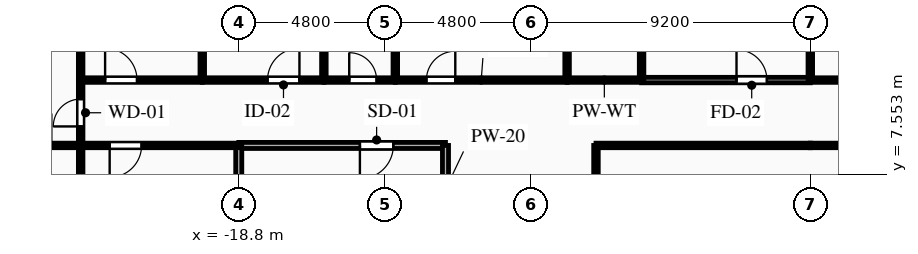
"""IFC4 building model, lengths in metres.
Left out: names, types, materials, properties, quantities, classifications, styles, units other than length and angle.
Written with IfcOpenShell. Run it as: python <this file> out.ifc"""

import sys

from ifc_helpers import new_model, si_unit, direction, frame, frame_2d, origin, place, context, subcontext, project, spatial, rectangle, extrude, element, fill, save


model = new_model("IFC4")
c1 = context("Model", 3, precision=1e-05, world=origin(), true_north=direction((0.0, 1.0)))
c2 = subcontext(c1, "Body", "Model", "MODEL_VIEW")
j1 = project(units=[si_unit("LENGTHUNIT", "METRE"), si_unit("PLANEANGLEUNIT", "RADIAN")], contexts=[c1])
p1 = place(None, origin())
s1 = spatial("IfcSite", under=j1, at=p1, CompositionType="ELEMENT")
p2 = place(p1, origin())
s2 = spatial("IfcBuilding", under=s1, at=p2, CompositionType="ELEMENT")
p3 = place(p2, frame((0.0, 0.0, 18.0)))
s3 = spatial("IfcBuildingStorey", under=s2, at=p3, CompositionType="ELEMENT", Elevation=18.0)
p4 = place(p3, frame((-12.0, 8.5, 0.0), z_axis=(0.0, 0.0, 1.0), x_axis=(-1.0, 0.0, 0.0)))
e1 = element("IfcWall", 1, at=p4, inside=s3, PredefinedType="PARTITIONING", context=c2, shape_type="SweptSolid", body=[
    extrude(rectangle(XDim=6.8, YDim=0.2, at=frame_2d((3.4, 0.0))), origin(), (0.0, 0.0, 1.0), 4.17),
])
p5 = place(p4, frame((1.715, 0.0, 0.0)))
e2 = element("IfcOpeningElement", 2, at=p5, cuts=e1, PredefinedType="OPENING", context=c2, shape_type="SweptSolid", body=[
    extrude(rectangle(XDim=1.1, YDim=2.15, at=frame_2d((0.55, 1.075))), frame((0.0, 0.11, 0.0), z_axis=(0.0, -1.0, 0.0), x_axis=(1.0, 0.0, 0.0)), (0.0, 0.0, 1.0), 0.22),
])
p6 = place(p3, frame((-12.0, 5.6, 0.0), z_axis=(0.0, 0.0, 1.0), x_axis=(0.0, 1.0, 0.0)))
e3 = element("IfcWall", 3, at=p6, inside=s3, PredefinedType="PARTITIONING", context=c2, shape_type="SweptSolid", body=[
    extrude(rectangle(XDim=2.9, YDim=0.2, at=frame_2d((1.45, 0.0))), origin(), (0.0, 0.0, 1.0), 4.17),
])
p7 = place(p3, frame((-18.8, 8.5, 0.0), z_axis=(0.0, 0.0, 1.0), x_axis=(0.0, -1.0, 0.0)))
e4 = element("IfcWall", 4, at=p7, inside=s3, PredefinedType="PARTITIONING", context=c2, shape_type="SweptSolid", body=[
    extrude(rectangle(XDim=2.9, YDim=0.2, at=frame_2d((1.45, 0.0))), origin(), (0.0, 0.0, 1.0), 3.655),
])
p8 = place(p3, frame((-24.0, 8.5, 0.0), z_axis=(0.0, 0.0, 1.0), x_axis=(0.0, 1.0, 0.0)))
e5 = element("IfcWall", 5, at=p8, inside=s3, PredefinedType="PARTITIONING", context=c2, shape_type="SweptSolid", body=[
    extrude(rectangle(XDim=2.15, YDim=0.15, at=frame_2d((1.075, 0.0))), origin(), (0.0, 0.0, 1.0), 4.17),
])
p9 = place(p8, frame((0.625, 0.0, 0.0)))
e6 = element("IfcOpeningElement", 6, at=p9, cuts=e5, PredefinedType="OPENING", context=c2, shape_type="SweptSolid", body=[
    extrude(rectangle(XDim=0.9, YDim=2.1, at=frame_2d((0.45, 1.05))), frame((0.0, 0.085, 0.0), z_axis=(0.0, -1.0, 0.0), x_axis=(1.0, 0.0, 0.0)), (0.0, 0.0, 1.0), 0.17),
])
p10 = place(p3, frame((-18.8, 8.5, 0.0), z_axis=(0.0, 0.0, 1.0), x_axis=(-1.0, 0.0, 0.0)))
e7 = element("IfcWall", 7, at=p10, inside=s3, PredefinedType="PARTITIONING", context=c2, shape_type="SweptSolid", body=[
    extrude(rectangle(XDim=5.2, YDim=0.15, at=frame_2d((2.6, 0.0))), origin(), (0.0, 0.0, 1.0), 4.17),
])
p11 = place(p10, frame((3.196, 0.0, 0.0)))
e8 = element("IfcOpeningElement", 8, at=p11, cuts=e7, PredefinedType="OPENING", context=c2, shape_type="SweptSolid", body=[
    extrude(rectangle(XDim=1.05, YDim=2.15, at=frame_2d((0.525, 1.075))), frame((0.0, 0.085, 0.0), z_axis=(0.0, -1.0, 0.0), x_axis=(1.0, 0.0, 0.0)), (0.0, 0.0, 1.0), 0.17),
])
p12 = place(p3, frame((-24.0, 10.65, 0.0), z_axis=(0.0, 0.0, 1.0), x_axis=(1.0, 0.0, 0.0)))
e9 = element("IfcWall", 9, at=p12, inside=s3, PredefinedType="PARTITIONING", context=c2, shape_type="SweptSolid", body=[
    extrude(rectangle(XDim=4.0, YDim=0.15, at=frame_2d((2.0, 0.0))), origin(), (0.0, 0.0, 1.0), 4.17),
])
p13 = place(p12, frame((0.804, 0.0, 0.0)))
e10 = element("IfcOpeningElement", 10, at=p13, cuts=e9, PredefinedType="OPENING", context=c2, shape_type="SweptSolid", body=[
    extrude(rectangle(XDim=1.05, YDim=2.15, at=frame_2d((0.525, 1.075))), frame((0.0, 0.085, 0.0), z_axis=(0.0, -1.0, 0.0), x_axis=(1.0, 0.0, 0.0)), (0.0, 0.0, 1.0), 0.17),
])
p14 = place(p3, frame((-20.0, 10.65, 0.0), z_axis=(0.0, 0.0, 1.0), x_axis=(1.0, 0.0, 0.0)))
e11 = element("IfcWall", 11, at=p14, inside=s3, PredefinedType="PARTITIONING", context=c2, shape_type="SweptSolid", body=[
    extrude(rectangle(XDim=4.0, YDim=0.15, at=frame_2d((2.0, 0.0))), origin(), (0.0, 0.0, 1.0), 4.17),
])
p15 = place(p14, frame((2.146, 0.0, 0.0)))
e12 = element("IfcOpeningElement", 12, at=p15, cuts=e11, PredefinedType="OPENING", context=c2, shape_type="SweptSolid", body=[
    extrude(rectangle(XDim=1.05, YDim=2.15, at=frame_2d((0.525, 1.075))), frame((0.0, 0.085, 0.0), z_axis=(0.0, -1.0, 0.0), x_axis=(1.0, 0.0, 0.0)), (0.0, 0.0, 1.0), 0.17),
])
p16 = place(p3, frame((-16.0, 10.65, 0.0), z_axis=(0.0, 0.0, 1.0), x_axis=(1.0, 0.0, 0.0)))
e13 = element("IfcWall", 13, at=p16, inside=s3, PredefinedType="PLUMBINGWALL", context=c2, shape_type="SweptSolid", body=[
    extrude(rectangle(XDim=2.35, YDim=0.15, at=frame_2d((1.175, 0.0))), origin(), (0.0, 0.0, 1.0), 4.17),
])
p17 = place(p16, frame((0.834, 0.0, 0.0)))
e14 = element("IfcOpeningElement", 14, at=p17, cuts=e13, PredefinedType="OPENING", context=c2, shape_type="SweptSolid", body=[
    extrude(rectangle(XDim=0.9, YDim=2.1, at=frame_2d((0.45, 1.05))), frame((0.0, 0.085, 0.0), z_axis=(0.0, -1.0, 0.0), x_axis=(1.0, 0.0, 0.0)), (0.0, 0.0, 1.0), 0.17),
])
p18 = place(p3, frame((-13.65, 10.65, 0.0), z_axis=(0.0, 0.0, 1.0), x_axis=(1.0, 0.0, 0.0)))
e15 = element("IfcWall", 15, at=p18, inside=s3, PredefinedType="PARTITIONING", context=c2, shape_type="SweptSolid", body=[
    extrude(rectangle(XDim=5.65, YDim=0.15, at=frame_2d((2.825, 0.0))), origin(), (0.0, 0.0, 1.0), 4.17),
])
p19 = place(p18, frame((1.022, 0.0, 0.0)))
e16 = element("IfcOpeningElement", 16, at=p19, cuts=e15, PredefinedType="OPENING", context=c2, shape_type="SweptSolid", body=[
    extrude(rectangle(XDim=0.95, YDim=2.1, at=frame_2d((0.475, 1.05))), frame((0.0, 0.085, 0.0), z_axis=(0.0, -1.0, 0.0), x_axis=(1.0, 0.0, 0.0)), (0.0, 0.0, 1.0), 0.17),
])
p20 = place(p3, frame((-5.55, 10.65, 0.0), z_axis=(0.0, 0.0, 1.0), x_axis=(1.0, 0.0, 0.0)))
e17 = element("IfcWall", 17, at=p20, inside=s3, PredefinedType="PARTITIONING", context=c2, shape_type="SweptSolid", body=[
    extrude(rectangle(XDim=5.55, YDim=0.18, at=frame_2d((2.775, 0.0))), origin(), (0.0, 0.0, 1.0), 4.17),
])
p21 = place(p20, frame((3.123, 0.0, 0.0)))
e18 = element("IfcOpeningElement", 18, at=p21, cuts=e17, PredefinedType="OPENING", context=c2, shape_type="SweptSolid", body=[
    extrude(rectangle(XDim=1.0, YDim=2.15, at=frame_2d((0.5, 1.075))), frame((0.0, 0.1, 0.0), z_axis=(0.0, -1.0, 0.0), x_axis=(1.0, 0.0, 0.0)), (0.0, 0.0, 1.0), 0.2),
])
p22 = place(p3, frame((-8.0, 10.65, 0.0), z_axis=(0.0, 0.0, 1.0), x_axis=(1.0, 0.0, 0.0)))
e19 = element("IfcWall", 19, at=p22, inside=s3, PredefinedType="PLUMBINGWALL", context=c2, shape_type="SweptSolid", body=[
    extrude(rectangle(XDim=2.45, YDim=0.15, at=frame_2d((1.225, 0.0))), origin(), (0.0, 0.0, 1.0), 4.17),
])
p23 = place(p3, frame((0.0, 8.5, 0.0), z_axis=(0.0, 0.0, 1.0), x_axis=(-1.0, 0.0, 0.0)))
e20 = element("IfcWall", 20, at=p23, inside=s3, PredefinedType="PARTITIONING", context=c2, shape_type="SweptSolid", body=[
    extrude(rectangle(XDim=7.05, YDim=0.15, at=frame_2d((3.525, 0.0))), origin(), (0.0, 0.0, 1.0), 4.17),
])
p24 = place(p3, frame((0.0, 10.65, 0.0), z_axis=(0.0, 0.0, 1.0), x_axis=(1.0, 0.0, 0.0)))
e21 = element("IfcWall", 21, at=p24, inside=s3, PredefinedType="PLUMBINGWALL", context=c2, shape_type="SweptSolid", body=[
    extrude(rectangle(XDim=2.45, YDim=0.15, at=frame_2d((1.225, 0.0))), origin(), (0.0, 0.0, 1.0), 4.17),
])
p25 = place(p3, frame((7.05, 8.5, 0.0), z_axis=(0.0, 0.0, 1.0), x_axis=(-1.0, 0.0, 0.0)))
e22 = element("IfcWall", 22, at=p25, inside=s3, PredefinedType="PARTITIONING", context=c2, shape_type="SweptSolid", body=[
    extrude(rectangle(XDim=7.05, YDim=0.15, at=frame_2d((3.525, 0.0))), origin(), (0.0, 0.0, 1.0), 4.17),
])
p26 = place(p3, frame((-7.05, 8.5, 0.0), z_axis=(0.0, 0.0, 1.0), x_axis=(0.0, -1.0, 0.0)))
e23 = element("IfcWall", 23, at=p26, inside=s3, PredefinedType="PARTITIONING", context=c2, shape_type="SweptSolid", body=[
    extrude(rectangle(XDim=14.1, YDim=0.15, at=frame_2d((7.05, 0.0))), origin(), (0.0, 0.0, 1.0), 4.17),
])
p27 = place(p26, frame((8.011, 0.0, 0.0)))
e24 = element("IfcOpeningElement", 24, at=p27, cuts=e23, PredefinedType="OPENING", context=c2, shape_type="SweptSolid", body=[
    extrude(rectangle(XDim=1.05, YDim=2.15, at=frame_2d((0.525, 1.075))), frame((0.0, 0.085, 0.0), z_axis=(0.0, -1.0, 0.0), x_axis=(1.0, 0.0, 0.0)), (0.0, 0.0, 1.0), 0.17),
])
p28 = place(p3, frame((-26.65, 8.5, 0.0), z_axis=(0.0, 0.0, 1.0), x_axis=(1.0, 0.0, 0.0)))
e25 = element("IfcWall", 25, at=p28, inside=s3, PredefinedType="PARTITIONING", context=c2, shape_type="SweptSolid", body=[
    extrude(rectangle(XDim=2.65, YDim=0.15, at=frame_2d((1.325, 0.0))), origin(), (0.0, 0.0, 1.0), 4.17),
])
p29 = place(p28, frame((0.635, 0.0, 0.0)))
e26 = element("IfcOpeningElement", 26, at=p29, cuts=e25, PredefinedType="OPENING", context=c2, shape_type="SweptSolid", body=[
    extrude(rectangle(XDim=1.05, YDim=2.15, at=frame_2d((0.525, 1.075))), frame((0.0, 0.085, 0.0), z_axis=(0.0, -1.0, 0.0), x_axis=(1.0, 0.0, 0.0)), (0.0, 0.0, 1.0), 0.17),
])
p30 = place(p3, frame((-24.0, 8.5, 0.0), z_axis=(0.0, 0.0, 1.0), x_axis=(0.0, -1.0, 0.0)))
e27 = element("IfcWall", 27, at=p30, inside=s3, PredefinedType="PARTITIONING", context=c2, shape_type="SweptSolid", body=[
    extrude(rectangle(XDim=14.1, YDim=0.15, at=frame_2d((7.05, 0.0))), origin(), (0.0, 0.0, 1.0), 4.17),
])
for number, where, z_axis, x_axis in (
    (28, (-24.0, 24.8, 0.0), (0.0, 0.0, 1.0), (0.0, -1.0, 0.0)),
    (29, (-20.0, 24.8, 0.0), (0.0, 0.0, 1.0), (0.0, -1.0, 0.0)),
):
    element("IfcWall", number, at=place(p3, frame(where, z_axis=z_axis, x_axis=x_axis)), inside=s3, PredefinedType="PARTITIONING", context=c2, shape_type="SweptSolid", body=[
        extrude(rectangle(XDim=14.15, YDim=0.15, at=frame_2d((7.075, 0.0))), origin(), (0.0, 0.0, 1.0), 4.17),
    ])
for number, where, z_axis, x_axis in (
    (30, (-16.0, 24.8, 0.0), (0.0, 0.0, 1.0), (0.0, -1.0, 0.0)),
    (31, (-13.65, 24.8, 0.0), (0.0, 0.0, 1.0), (0.0, -1.0, 0.0)),
):
    element("IfcWall", number, at=place(p3, frame(where, z_axis=z_axis, x_axis=x_axis)), inside=s3, PredefinedType="PLUMBINGWALL", context=c2, shape_type="SweptSolid", body=[
        extrude(rectangle(XDim=14.15, YDim=0.15, at=frame_2d((7.075, 0.0))), origin(), (0.0, 0.0, 1.0), 4.17),
    ])
for number, where, z_axis, x_axis in (
    (32, (-8.0, 12.8, 0.0), (0.0, 0.0, 1.0), (0.0, -1.0, 0.0)),
    (33, (-5.55, 10.65, 0.0), (0.0, 0.0, 1.0), (0.0, 1.0, 0.0)),
    (34, (0.0, 12.8, 0.0), (0.0, 0.0, 1.0), (0.0, -1.0, 0.0)),
):
    element("IfcWall", number, at=place(p3, frame(where, z_axis=z_axis, x_axis=x_axis)), inside=s3, PredefinedType="PLUMBINGWALL", context=c2, shape_type="SweptSolid", body=[
        extrude(rectangle(XDim=2.15, YDim=0.15, at=frame_2d((1.075, 0.0))), origin(), (0.0, 0.0, 1.0), 4.17),
    ])
p31 = place(p5, origin())
e35 = element("IfcDoor", 35, at=p31, inside=s3, OperationType="SINGLE_SWING_RIGHT", PredefinedType="DOOR", context=c2, shape_type="SweptSolid", body=[
    extrude(rectangle(XDim=1.1, YDim=2.15, at=frame_2d((0.55, 1.075))), frame((0.0, 0.025, 0.0), z_axis=(0.0, -1.0, 0.0), x_axis=(1.0, 0.0, 0.0)), (0.0, 0.0, 1.0), 0.05),
])
fill(e2, e35)
p32 = place(p9, origin())
e36 = element("IfcDoor", 36, at=p32, inside=s3, OperationType="SINGLE_SWING_LEFT", PredefinedType="DOOR", context=c2, shape_type="SweptSolid", body=[
    extrude(rectangle(XDim=0.9, YDim=2.1, at=frame_2d((0.45, 1.05))), frame((0.0, 0.025, 0.0), z_axis=(0.0, -1.0, 0.0), x_axis=(1.0, 0.0, 0.0)), (0.0, 0.0, 1.0), 0.05),
])
fill(e6, e36)
p33 = place(p11, origin())
e37 = element("IfcDoor", 37, at=p33, inside=s3, OperationType="SINGLE_SWING_RIGHT", PredefinedType="DOOR", context=c2, shape_type="SweptSolid", body=[
    extrude(rectangle(XDim=1.05, YDim=2.15, at=frame_2d((0.525, 1.075))), frame((0.0, 0.025, 0.0), z_axis=(0.0, -1.0, 0.0), x_axis=(1.0, 0.0, 0.0)), (0.0, 0.0, 1.0), 0.05),
])
fill(e8, e37)
p34 = place(p13, origin())
e38 = element("IfcDoor", 38, at=p34, inside=s3, OperationType="SINGLE_SWING_LEFT", PredefinedType="DOOR", context=c2, shape_type="SweptSolid", body=[
    extrude(rectangle(XDim=1.05, YDim=2.15, at=frame_2d((0.525, 1.075))), frame((0.0, 0.025, 0.0), z_axis=(0.0, -1.0, 0.0), x_axis=(1.0, 0.0, 0.0)), (0.0, 0.0, 1.0), 0.05),
])
fill(e10, e38)
p35 = place(p15, origin())
e39 = element("IfcDoor", 39, at=p35, inside=s3, OperationType="SINGLE_SWING_RIGHT", PredefinedType="DOOR", context=c2, shape_type="SweptSolid", body=[
    extrude(rectangle(XDim=1.05, YDim=2.15, at=frame_2d((0.525, 1.075))), frame((0.0, 0.025, 0.0), z_axis=(0.0, -1.0, 0.0), x_axis=(1.0, 0.0, 0.0)), (0.0, 0.0, 1.0), 0.05),
])
fill(e12, e39)
p36 = place(p17, origin())
e40 = element("IfcDoor", 40, at=p36, inside=s3, OperationType="SINGLE_SWING_LEFT", PredefinedType="DOOR", context=c2, shape_type="SweptSolid", body=[
    extrude(rectangle(XDim=0.9, YDim=2.1, at=frame_2d((0.45, 1.05))), frame((0.0, 0.025, 0.0), z_axis=(0.0, -1.0, 0.0), x_axis=(1.0, 0.0, 0.0)), (0.0, 0.0, 1.0), 0.05),
])
fill(e14, e40)
p37 = place(p19, origin())
e41 = element("IfcDoor", 41, at=p37, inside=s3, OperationType="SINGLE_SWING_RIGHT", PredefinedType="DOOR", context=c2, shape_type="SweptSolid", body=[
    extrude(rectangle(XDim=0.95, YDim=2.1, at=frame_2d((0.475, 1.05))), frame((0.0, 0.025, 0.0), z_axis=(0.0, -1.0, 0.0), x_axis=(1.0, 0.0, 0.0)), (0.0, 0.0, 1.0), 0.05),
])
fill(e16, e41)
p38 = place(p21, origin())
e42 = element("IfcDoor", 42, at=p38, inside=s3, OperationType="SINGLE_SWING_LEFT", PredefinedType="DOOR", context=c2, shape_type="SweptSolid", body=[
    extrude(rectangle(XDim=1.0, YDim=2.15, at=frame_2d((0.5, 1.075))), frame((0.0, 0.025, 0.0), z_axis=(0.0, -1.0, 0.0), x_axis=(1.0, 0.0, 0.0)), (0.0, 0.0, 1.0), 0.05),
])
fill(e18, e42)
save(model, sys.argv[1])
